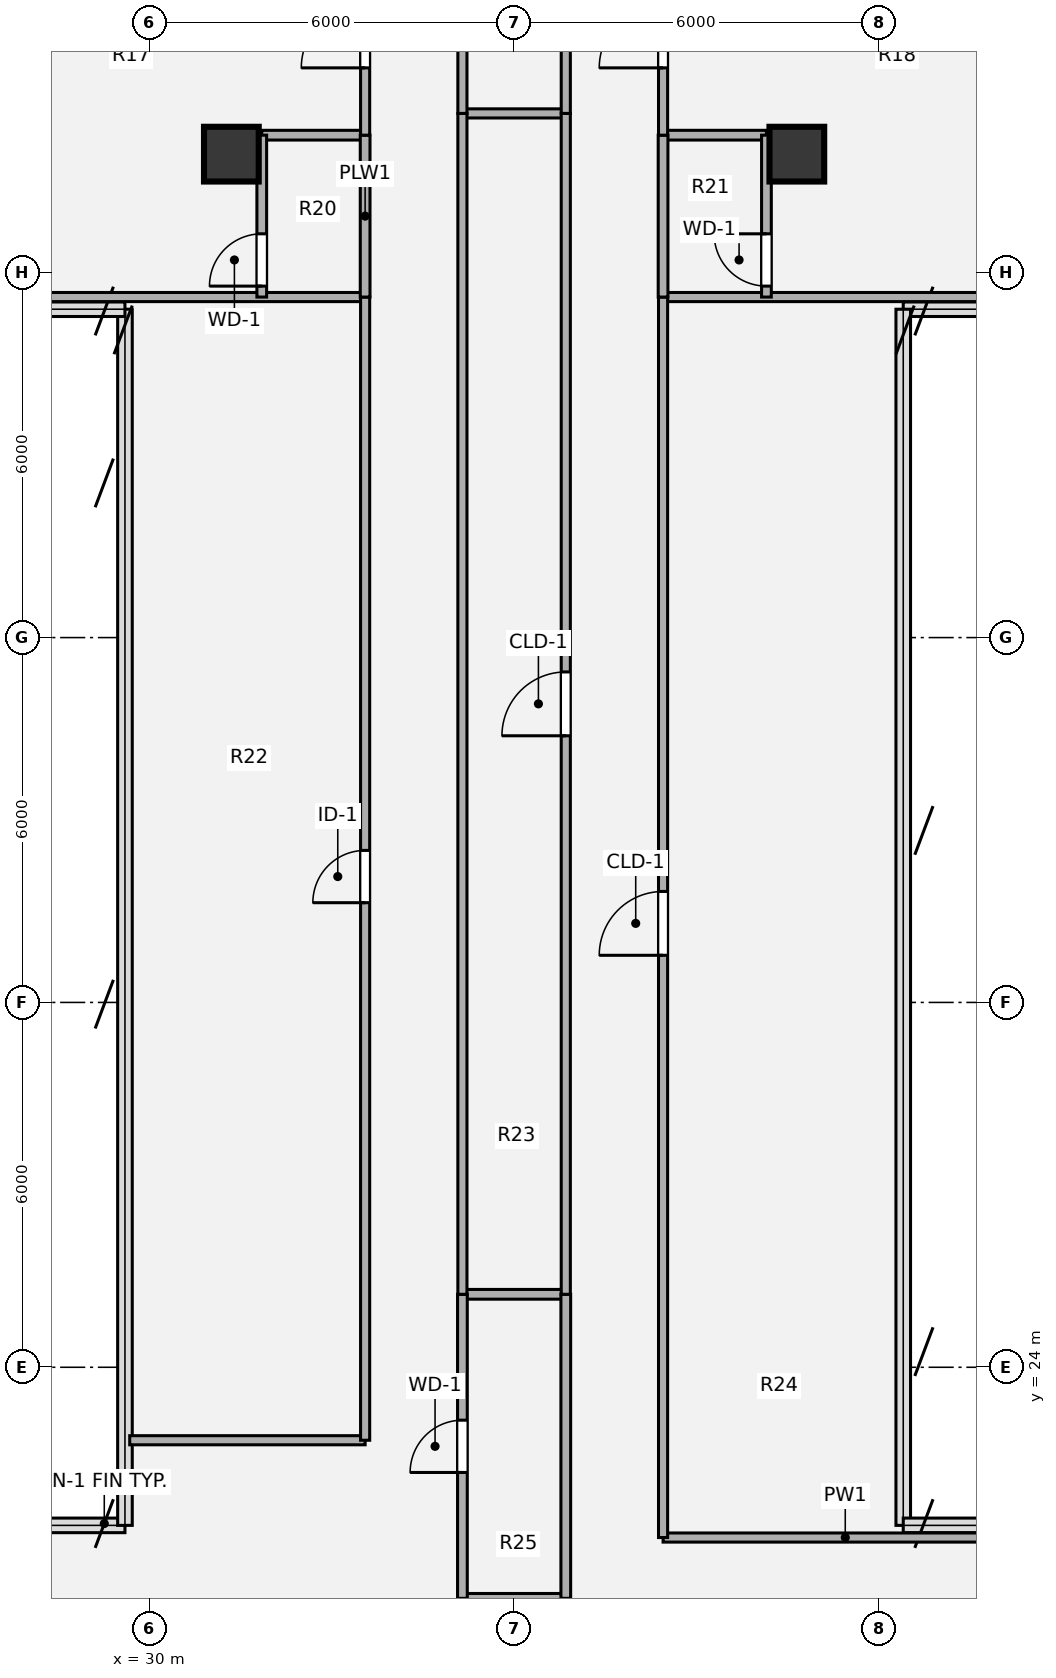
"""IFC4 building model, lengths in metres.
Left out: names, types, materials, properties, quantities, classifications, styles, units other than length and angle.
Written with IfcOpenShell. Run it as: python <this file> out.ifc"""

import sys

from ifc_helpers import new_model, si_unit, direction, frame, frame_2d, origin, origin_2d, place, context, subcontext, project, spatial, rectangle, hollow_circle, extrude, source, transform, mapped, element, fill, save


model = new_model("IFC4")
c1 = context("Model", 3, precision=1e-05, world=origin(), true_north=direction((0.0, 1.0)))
c2 = subcontext(c1, "Body", "Model", "MODEL_VIEW")
j1 = project(units=[si_unit("LENGTHUNIT", "METRE"), si_unit("PLANEANGLEUNIT", "RADIAN")], contexts=[c1])
p1 = place(None, origin())
s1 = spatial("IfcSite", under=j1, at=p1, CompositionType="ELEMENT")
p2 = place(p1, origin())
s2 = spatial("IfcBuilding", under=s1, at=p2, CompositionType="ELEMENT")
p3 = place(p2, frame((0.0, 0.0, 234.36)))
s3 = spatial("IfcBuildingStorey", under=s2, at=p3, CompositionType="ELEMENT", Elevation=234.36)
m1 = source(origin(), c2, "Body", "SweptSolid", [
    extrude(hollow_circle(Radius=0.45, WallThickness=0.032, at=origin_2d()), origin(), (0.0, 0.0, 1.0), 3.78),
])
for number, where, z_axis, x_axis in (
    (1, (31.35, 43.95, 0.0), (0.0, 0.0, 1.0), (1.0, 0.0, 0.0)),
    (2, (40.65, 43.95, 0.0), (0.0, 0.0, 1.0), (1.0, 0.0, 0.0)),
):
    element("IfcColumn", number, at=place(p3, frame(where, z_axis=z_axis, x_axis=x_axis)), inside=s3, PredefinedType="COLUMN", context=c2, shape_type="MappedRepresentation", body=[
        mapped(m1, transform((0.0, 0.0, 0.0), x_axis=(1.0, 0.0, 0.0), y_axis=(0.0, 1.0, 0.0), z_axis=(0.0, 0.0, 1.0), scale=1.0)),
    ])
p4 = place(p3, frame((35.15, 20.2, 0.0), z_axis=(0.0, 0.0, 1.0), x_axis=(1.0, 0.0, 0.0)))
e3 = element("IfcWall", 3, at=p4, inside=s3, PredefinedType="PLUMBINGWALL", context=c2, shape_type="SweptSolid", body=[
    extrude(rectangle(XDim=1.7, YDim=0.16, at=frame_2d((0.85, 0.0))), origin(), (0.0, 0.0, 1.0), 3.5),
])
p5 = place(p3, frame((38.45, 21.2, 0.0), z_axis=(0.0, 0.0, 1.0), x_axis=(1.0, 0.0, 0.0)))
e4 = element("IfcWall", 4, at=p5, inside=s3, PredefinedType="PARTITIONING", context=c2, shape_type="SweptSolid", body=[
    extrude(rectangle(XDim=5.993, YDim=0.15, at=frame_2d((2.997, 0.0))), origin(), (0.0, 0.0, 1.0), 3.5),
])
p6 = place(p3, frame((29.678, 22.8, 0.0), z_axis=(0.0, 0.0, 1.0), x_axis=(1.0, 0.0, 0.0)))
e5 = element("IfcWall", 5, at=p6, inside=s3, PredefinedType="PARTITIONING", context=c2, shape_type="SweptSolid", body=[
    extrude(rectangle(XDim=3.872, YDim=0.15, at=frame_2d((1.936, 0.0))), origin(), (0.0, 0.0, 1.0), 3.5),
])
p7 = place(p3, frame((35.15, 25.2, 0.0), z_axis=(0.0, 0.0, 1.0), x_axis=(1.0, 0.0, 0.0)))
e6 = element("IfcWall", 6, at=p7, inside=s3, PredefinedType="PLUMBINGWALL", context=c2, shape_type="SweptSolid", body=[
    extrude(rectangle(XDim=1.7, YDim=0.16, at=frame_2d((0.85, 0.0))), origin(), (0.0, 0.0, 1.0), 3.5),
])
p8 = place(p3, frame((27.558, 41.6, 0.0), z_axis=(0.0, 0.0, 1.0), x_axis=(1.0, 0.0, 0.0)))
e7 = element("IfcWall", 7, at=p8, inside=s3, PredefinedType="PARTITIONING", context=c2, shape_type="SweptSolid", body=[
    extrude(rectangle(XDim=5.992, YDim=0.15, at=frame_2d((2.996, 0.0))), origin(), (0.0, 0.0, 1.0), 3.5),
])
p9 = place(p3, frame((38.45, 41.6, 0.0), z_axis=(0.0, 0.0, 1.0), x_axis=(1.0, 0.0, 0.0)))
e8 = element("IfcWall", 8, at=p9, inside=s3, PredefinedType="PARTITIONING", context=c2, shape_type="SweptSolid", body=[
    extrude(rectangle(XDim=5.993, YDim=0.15, at=frame_2d((2.997, 0.0))), origin(), (0.0, 0.0, 1.0), 3.5),
])
for number, where, z_axis, x_axis in (
    (9, (31.85, 44.262, 0.0), (0.0, 0.0, 1.0), (1.0, 0.0, 0.0)),
    (10, (38.45, 44.262, 0.0), (0.0, 0.0, 1.0), (1.0, 0.0, 0.0)),
):
    element("IfcWall", number, at=place(p3, frame(where, z_axis=z_axis, x_axis=x_axis)), inside=s3, PredefinedType="PLUMBINGWALL", context=c2, shape_type="SweptSolid", body=[
        extrude(rectangle(XDim=1.7, YDim=0.16, at=frame_2d((0.85, 0.0))), origin(), (0.0, 0.0, 1.0), 2.903),
    ])
p10 = place(p3, frame((35.15, 44.62, 0.0), z_axis=(0.0, 0.0, 1.0), x_axis=(1.0, 0.0, 0.0)))
e11 = element("IfcWall", 11, at=p10, inside=s3, PredefinedType="PARTITIONING", context=c2, shape_type="SweptSolid", body=[
    extrude(rectangle(XDim=1.7, YDim=0.15, at=frame_2d((0.85, 0.0))), origin(), (0.0, 0.0, 1.0), 3.259),
])
p11 = place(p3, frame((31.85, 41.6, 0.0), z_axis=(0.0, 0.0, 1.0), x_axis=(0.0, 1.0, 0.0)))
e12 = element("IfcWall", 12, at=p11, inside=s3, PredefinedType="PLUMBINGWALL", context=c2, shape_type="SweptSolid", body=[
    extrude(rectangle(XDim=2.662, YDim=0.16, at=frame_2d((1.331, 0.0))), origin(), (0.0, 0.0, 1.0), 3.5),
])
p12 = place(p11, frame((0.18, 0.0, 0.0)))
e13 = element("IfcOpeningElement", 13, at=p12, cuts=e12, PredefinedType="OPENING", context=c2, shape_type="SweptSolid", body=[
    extrude(rectangle(XDim=0.86, YDim=2.1, at=origin_2d()), frame((0.43, 0.09, 1.05), z_axis=(0.0, -1.0, 0.0), x_axis=(1.0, 0.0, 0.0)), (0.0, 0.0, 1.0), 0.18),
])
p13 = place(p3, frame((33.55, 22.8, 0.0), z_axis=(0.0, 0.0, 1.0), x_axis=(0.0, 1.0, 0.0)))
e14 = element("IfcWall", 14, at=p13, inside=s3, PredefinedType="PARTITIONING", context=c2, shape_type="SweptSolid", body=[
    extrude(rectangle(XDim=18.8, YDim=0.15, at=frame_2d((9.4, 0.0))), origin(), (0.0, 0.0, 1.0), 3.5),
])
p14 = place(p13, frame((8.84, 0.0, 0.0)))
e15 = element("IfcOpeningElement", 15, at=p14, cuts=e14, PredefinedType="OPENING", context=c2, shape_type="SweptSolid", body=[
    extrude(rectangle(XDim=0.86, YDim=2.1, at=origin_2d()), frame((0.43, 0.085, 1.05), z_axis=(0.0, -1.0, 0.0), x_axis=(1.0, 0.0, 0.0)), (0.0, 0.0, 1.0), 0.17),
])
p15 = place(p3, frame((33.55, 41.6, 0.0), z_axis=(0.0, 0.0, 1.0), x_axis=(0.0, 1.0, 0.0)))
e16 = element("IfcWall", 16, at=p15, inside=s3, PredefinedType="PLUMBINGWALL", context=c2, shape_type="SweptSolid", body=[
    extrude(rectangle(XDim=2.662, YDim=0.16, at=frame_2d((1.331, 0.0))), origin(), (0.0, 0.0, 1.0), 3.5),
])
p16 = place(p3, frame((33.55, 44.262, 0.0), z_axis=(0.0, 0.0, 1.0), x_axis=(0.0, 1.0, 0.0)))
e17 = element("IfcWall", 17, at=p16, inside=s3, PredefinedType="PARTITIONING", context=c2, shape_type="SweptSolid", body=[
    extrude(rectangle(XDim=3.254, YDim=0.15, at=frame_2d((1.627, 0.0))), origin(), (0.0, 0.0, 1.0), 3.5),
])
p17 = place(p16, frame((1.107, 0.0, 0.0)))
e18 = element("IfcOpeningElement", 18, at=p17, cuts=e17, PredefinedType="OPENING", context=c2, shape_type="SweptSolid", body=[
    extrude(rectangle(XDim=1.05, YDim=2.1, at=origin_2d()), frame((0.525, 0.085, 1.05), z_axis=(0.0, -1.0, 0.0), x_axis=(1.0, 0.0, 0.0)), (0.0, 0.0, 1.0), 0.17),
])
p18 = place(p3, frame((35.15, 20.2, 0.0), z_axis=(0.0, 0.0, 1.0), x_axis=(0.0, 1.0, 0.0)))
e19 = element("IfcWall", 19, at=p18, inside=s3, PredefinedType="PLUMBINGWALL", context=c2, shape_type="SweptSolid", body=[
    extrude(rectangle(XDim=5.0, YDim=0.16, at=frame_2d((2.5, 0.0))), origin(), (0.0, 0.0, 1.0), 3.5),
])
p19 = place(p18, frame((2.07, 0.0, 0.0)))
e20 = element("IfcOpeningElement", 20, at=p19, cuts=e19, PredefinedType="OPENING", context=c2, shape_type="SweptSolid", body=[
    extrude(rectangle(XDim=0.86, YDim=2.1, at=origin_2d()), frame((0.43, 0.09, 1.05), z_axis=(0.0, -1.0, 0.0), x_axis=(1.0, 0.0, 0.0)), (0.0, 0.0, 1.0), 0.18),
])
p20 = place(p3, frame((35.15, 25.2, 0.0), z_axis=(0.0, 0.0, 1.0), x_axis=(0.0, 1.0, 0.0)))
e21 = element("IfcWall", 21, at=p20, inside=s3, PredefinedType="PARTITIONING", context=c2, shape_type="SweptSolid", body=[
    extrude(rectangle(XDim=19.42, YDim=0.15, at=frame_2d((9.71, 0.0))), origin(), (0.0, 0.0, 1.0), 3.5),
])
p21 = place(p3, frame((35.15, 44.62, 0.0), z_axis=(0.0, 0.0, 1.0), x_axis=(0.0, 1.0, 0.0)))
e22 = element("IfcWall", 22, at=p21, inside=s3, PredefinedType="PARTITIONING", context=c2, shape_type="SweptSolid", body=[
    extrude(rectangle(XDim=12.58, YDim=0.15, at=frame_2d((6.29, 0.0))), origin(), (0.0, 0.0, 1.0), 3.5),
])
p22 = place(p21, frame((5.83, 0.0, 0.0)))
e23 = element("IfcOpeningElement", 23, at=p22, cuts=e22, PredefinedType="OPENING", context=c2, shape_type="SweptSolid", body=[
    extrude(rectangle(XDim=0.86, YDim=2.1, at=origin_2d()), frame((0.43, 0.085, 1.05), z_axis=(0.0, -1.0, 0.0), x_axis=(1.0, 0.0, 0.0)), (0.0, 0.0, 1.0), 0.17),
])
p23 = place(p3, frame((36.85, 20.2, 0.0), z_axis=(0.0, 0.0, 1.0), x_axis=(0.0, 1.0, 0.0)))
e24 = element("IfcWall", 24, at=p23, inside=s3, PredefinedType="PLUMBINGWALL", context=c2, shape_type="SweptSolid", body=[
    extrude(rectangle(XDim=5.0, YDim=0.16, at=frame_2d((2.5, 0.0))), origin(), (0.0, 0.0, 1.0), 3.5),
])
p24 = place(p3, frame((36.85, 25.2, 0.0), z_axis=(0.0, 0.0, 1.0), x_axis=(0.0, 1.0, 0.0)))
e25 = element("IfcWall", 25, at=p24, inside=s3, PredefinedType="PARTITIONING", context=c2, shape_type="SweptSolid", body=[
    extrude(rectangle(XDim=19.42, YDim=0.15, at=frame_2d((9.71, 0.0))), origin(), (0.0, 0.0, 1.0), 3.5),
])
p25 = place(p24, frame((9.185, 0.0, 0.0)))
e26 = element("IfcOpeningElement", 26, at=p25, cuts=e25, PredefinedType="OPENING", context=c2, shape_type="SweptSolid", body=[
    extrude(rectangle(XDim=1.05, YDim=2.1, at=origin_2d()), frame((0.525, 0.085, 1.05), z_axis=(0.0, -1.0, 0.0), x_axis=(1.0, 0.0, 0.0)), (0.0, 0.0, 1.0), 0.17),
])
p26 = place(p3, frame((36.85, 44.62, 0.0), z_axis=(0.0, 0.0, 1.0), x_axis=(0.0, 1.0, 0.0)))
e27 = element("IfcWall", 27, at=p26, inside=s3, PredefinedType="PARTITIONING", context=c2, shape_type="SweptSolid", body=[
    extrude(rectangle(XDim=12.58, YDim=0.15, at=frame_2d((6.29, 0.0))), origin(), (0.0, 0.0, 1.0), 3.5),
])
p27 = place(p3, frame((38.45, 21.2, 0.0), z_axis=(0.0, 0.0, 1.0), x_axis=(0.0, 1.0, 0.0)))
e28 = element("IfcWall", 28, at=p27, inside=s3, PredefinedType="PARTITIONING", context=c2, shape_type="SweptSolid", body=[
    extrude(rectangle(XDim=20.4, YDim=0.15, at=frame_2d((10.2, 0.0))), origin(), (0.0, 0.0, 1.0), 3.5),
])
p28 = place(p27, frame((9.575, 0.0, 0.0)))
e29 = element("IfcOpeningElement", 29, at=p28, cuts=e28, PredefinedType="OPENING", context=c2, shape_type="SweptSolid", body=[
    extrude(rectangle(XDim=1.05, YDim=2.1, at=origin_2d()), frame((0.525, 0.085, 1.05), z_axis=(0.0, -1.0, 0.0), x_axis=(1.0, 0.0, 0.0)), (0.0, 0.0, 1.0), 0.17),
])
p29 = place(p3, frame((38.45, 41.6, 0.0), z_axis=(0.0, 0.0, 1.0), x_axis=(0.0, 1.0, 0.0)))
e30 = element("IfcWall", 30, at=p29, inside=s3, PredefinedType="PLUMBINGWALL", context=c2, shape_type="SweptSolid", body=[
    extrude(rectangle(XDim=2.662, YDim=0.16, at=frame_2d((1.331, 0.0))), origin(), (0.0, 0.0, 1.0), 3.5),
])
p30 = place(p3, frame((38.45, 44.262, 0.0), z_axis=(0.0, 0.0, 1.0), x_axis=(0.0, 1.0, 0.0)))
e31 = element("IfcWall", 31, at=p30, inside=s3, PredefinedType="PARTITIONING", context=c2, shape_type="SweptSolid", body=[
    extrude(rectangle(XDim=3.254, YDim=0.15, at=frame_2d((1.627, 0.0))), origin(), (0.0, 0.0, 1.0), 3.5),
])
p31 = place(p30, frame((1.107, 0.0, 0.0)))
e32 = element("IfcOpeningElement", 32, at=p31, cuts=e31, PredefinedType="OPENING", context=c2, shape_type="SweptSolid", body=[
    extrude(rectangle(XDim=1.05, YDim=2.1, at=origin_2d()), frame((0.525, 0.085, 1.05), z_axis=(0.0, -1.0, 0.0), x_axis=(1.0, 0.0, 0.0)), (0.0, 0.0, 1.0), 0.17),
])
p32 = place(p3, frame((40.15, 41.6, 0.0), z_axis=(0.0, 0.0, 1.0), x_axis=(0.0, 1.0, 0.0)))
e33 = element("IfcWall", 33, at=p32, inside=s3, PredefinedType="PLUMBINGWALL", context=c2, shape_type="SweptSolid", body=[
    extrude(rectangle(XDim=2.662, YDim=0.16, at=frame_2d((1.331, 0.0))), origin(), (0.0, 0.0, 1.0), 3.5),
])
p33 = place(p32, frame((0.18, 0.0, 0.0)))
e34 = element("IfcOpeningElement", 34, at=p33, cuts=e33, PredefinedType="OPENING", context=c2, shape_type="SweptSolid", body=[
    extrude(rectangle(XDim=0.86, YDim=2.1, at=origin_2d()), frame((0.43, 0.09, 1.05), z_axis=(0.0, -1.0, 0.0), x_axis=(1.0, 0.0, 0.0)), (0.0, 0.0, 1.0), 0.18),
])
m2 = source(origin(), c2, "Body", "SweptSolid", [
    extrude(rectangle(XDim=0.86, YDim=2.1, at=origin_2d()), frame((0.43, 0.025, 1.05), z_axis=(0.0, -1.0, 0.0), x_axis=(1.0, 0.0, 0.0)), (0.0, 0.0, 1.0), 0.05),
])
p34 = place(p12, origin())
e35 = element("IfcDoor", 35, at=p34, inside=s3, OperationType="SINGLE_SWING_LEFT", PredefinedType="DOOR", context=c2, shape_type="MappedRepresentation", body=[
    mapped(m2, transform((0.0, 0.0, 0.0), x_axis=(1.0, 0.0, 0.0), y_axis=(0.0, 1.0, 0.0), z_axis=(0.0, 0.0, 1.0), scale=1.0)),
])
fill(e13, e35)
m3 = source(origin(), c2, "Body", "SweptSolid", [
    extrude(rectangle(XDim=0.86, YDim=2.1, at=origin_2d()), frame((0.43, 0.025, 1.05), z_axis=(0.0, -1.0, 0.0), x_axis=(1.0, 0.0, 0.0)), (0.0, 0.0, 1.0), 0.05),
])
p35 = place(p14, origin())
e36 = element("IfcDoor", 36, at=p35, inside=s3, OperationType="SINGLE_SWING_LEFT", PredefinedType="DOOR", context=c2, shape_type="MappedRepresentation", body=[
    mapped(m3, transform((0.0, 0.0, 0.0), x_axis=(1.0, 0.0, 0.0), y_axis=(0.0, 1.0, 0.0), z_axis=(0.0, 0.0, 1.0), scale=1.0)),
])
fill(e15, e36)
m4 = source(origin(), c2, "Body", "SweptSolid", [
    extrude(rectangle(XDim=1.05, YDim=2.1, at=origin_2d()), frame((0.525, 0.025, 1.05), z_axis=(0.0, -1.0, 0.0), x_axis=(1.0, 0.0, 0.0)), (0.0, 0.0, 1.0), 0.05),
])
p36 = place(p17, origin())
e37 = element("IfcDoor", 37, at=p36, inside=s3, OperationType="SINGLE_SWING_LEFT", PredefinedType="DOOR", context=c2, shape_type="MappedRepresentation", body=[
    mapped(m4, transform((0.0, 0.0, 0.0), x_axis=(1.0, 0.0, 0.0), y_axis=(0.0, 1.0, 0.0), z_axis=(0.0, 0.0, 1.0), scale=1.0)),
])
fill(e18, e37)
p37 = place(p19, origin())
e38 = element("IfcDoor", 38, at=p37, inside=s3, OperationType="SINGLE_SWING_LEFT", PredefinedType="DOOR", context=c2, shape_type="MappedRepresentation", body=[
    mapped(m2, transform((0.0, 0.0, 0.0), x_axis=(1.0, 0.0, 0.0), y_axis=(0.0, 1.0, 0.0), z_axis=(0.0, 0.0, 1.0), scale=1.0)),
])
fill(e20, e38)
m5 = source(origin(), c2, "Body", "SweptSolid", [
    extrude(rectangle(XDim=1.05, YDim=2.1, at=origin_2d()), frame((0.525, 0.025, 1.05), z_axis=(0.0, -1.0, 0.0), x_axis=(1.0, 0.0, 0.0)), (0.0, 0.0, 1.0), 0.05),
])
p38 = place(p25, origin())
e39 = element("IfcDoor", 39, at=p38, inside=s3, OperationType="SINGLE_SWING_LEFT", PredefinedType="DOOR", context=c2, shape_type="MappedRepresentation", body=[
    mapped(m5, transform((0.0, 0.0, 0.0), x_axis=(1.0, 0.0, 0.0), y_axis=(0.0, 1.0, 0.0), z_axis=(0.0, 0.0, 1.0), scale=1.0)),
])
fill(e26, e39)
p39 = place(p28, origin())
e40 = element("IfcDoor", 40, at=p39, inside=s3, OperationType="SINGLE_SWING_LEFT", PredefinedType="DOOR", context=c2, shape_type="MappedRepresentation", body=[
    mapped(m5, transform((0.0, 0.0, 0.0), x_axis=(1.0, 0.0, 0.0), y_axis=(0.0, 1.0, 0.0), z_axis=(0.0, 0.0, 1.0), scale=1.0)),
])
fill(e29, e40)
p40 = place(p31, origin())
e41 = element("IfcDoor", 41, at=p40, inside=s3, OperationType="SINGLE_SWING_LEFT", PredefinedType="DOOR", context=c2, shape_type="MappedRepresentation", body=[
    mapped(m4, transform((0.0, 0.0, 0.0), x_axis=(1.0, 0.0, 0.0), y_axis=(0.0, 1.0, 0.0), z_axis=(0.0, 0.0, 1.0), scale=1.0)),
])
fill(e32, e41)
p41 = place(p33, origin())
e42 = element("IfcDoor", 42, at=p41, inside=s3, OperationType="SINGLE_SWING_RIGHT", PredefinedType="DOOR", context=c2, shape_type="MappedRepresentation", body=[
    mapped(m2, transform((0.0, 0.0, 0.0), x_axis=(1.0, 0.0, 0.0), y_axis=(0.0, 1.0, 0.0), z_axis=(0.0, 0.0, 1.0), scale=1.0)),
])
fill(e34, e42)
save(model, sys.argv[1])
